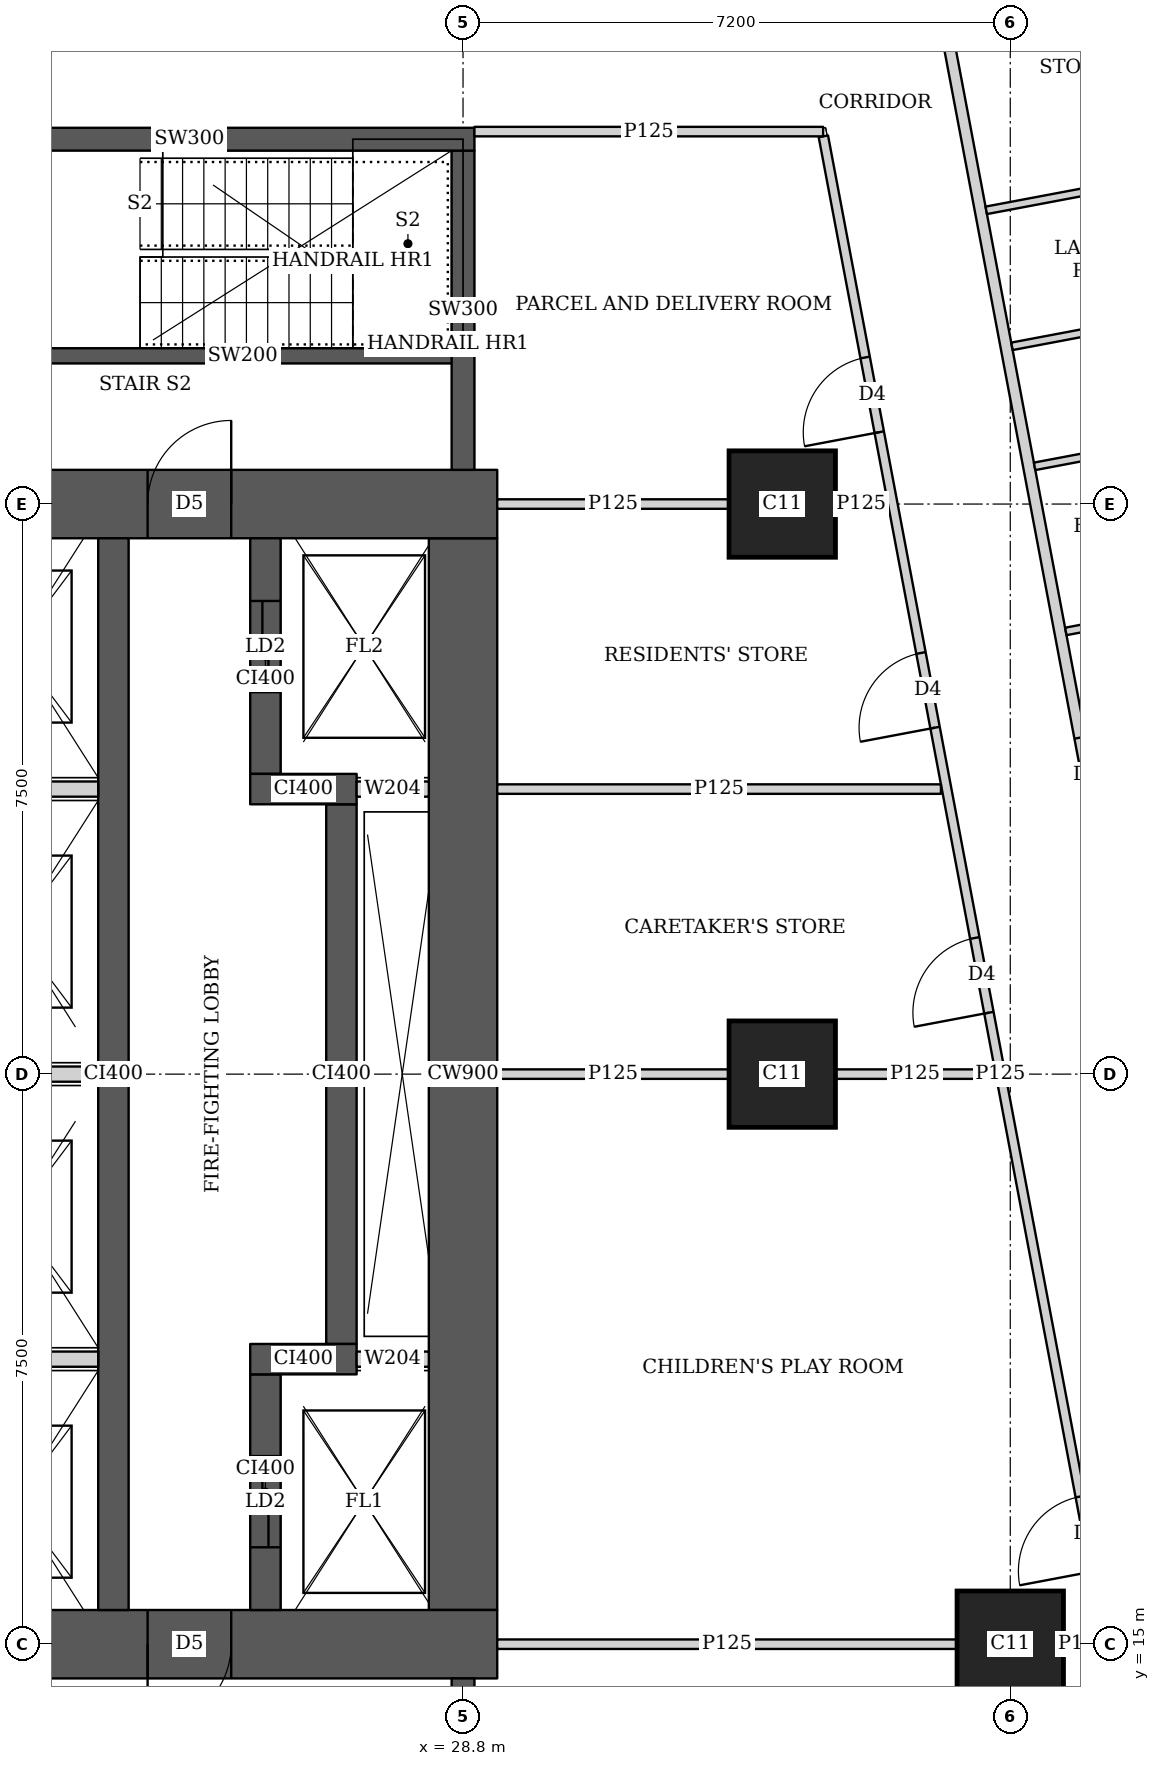
"""IFC4 building model, lengths in metres.
Left out: names, types, materials, properties, quantities, classifications, styles, units other than length and angle.
Written with IfcOpenShell. Run it as: python <this file> out.ifc"""

import sys

from ifc_helpers import new_model, si_unit, direction, frame, frame_2d, origin, origin_2d, place, context, subcontext, project, spatial, rectangle, extrude, element, fill, save


model = new_model("IFC4")
c1 = context("Model", 3, precision=1e-05, world=origin(), true_north=direction((0.0, 1.0)))
c2 = subcontext(c1, "Body", "Model", "MODEL_VIEW")
j1 = project(units=[si_unit("LENGTHUNIT", "METRE"), si_unit("PLANEANGLEUNIT", "RADIAN")], contexts=[c1])
p1 = place(None, origin())
s1 = spatial("IfcSite", under=j1, at=p1, CompositionType="ELEMENT")
p2 = place(p1, origin())
s2 = spatial("IfcBuilding", under=s1, at=p2, CompositionType="ELEMENT")
p3 = place(p2, frame((0.0, 0.0, 270.35)))
s3 = spatial("IfcBuildingStorey", under=s2, at=p3, CompositionType="ELEMENT", Elevation=270.35)
for number, where, z_axis, x_axis in (
    (1, (36.0, 15.0, 0.0), (0.0, 0.0, 1.0), (1.0, 0.0, 0.0)),
    (2, (33.0, 22.5, 0.0), (0.0, 0.0, 1.0), (1.0, 0.0, 0.0)),
    (3, (33.0, 30.0, 0.0), (0.0, 0.0, 1.0), (1.0, 0.0, 0.0)),
):
    element("IfcColumn", number, at=place(p3, frame(where, z_axis=z_axis, x_axis=x_axis)), inside=s3, PredefinedType="COLUMN", context=c2, shape_type="SweptSolid", body=[
        extrude(rectangle(XDim=1.4, YDim=1.4, at=origin_2d()), origin(), (0.0, 0.0, 1.0), 3.75),
    ])
p4 = place(p3, frame((13.95, 15.0, 0.0), z_axis=(0.0, 0.0, 1.0), x_axis=(1.0, 0.0, 0.0)))
e4 = element("IfcWall", 4, at=p4, inside=s3, PredefinedType="SHEAR", context=c2, shape_type="SweptSolid", body=[
    extrude(rectangle(XDim=15.3, YDim=0.9, at=frame_2d((7.65, 0.0))), origin(), (0.0, 0.0, 1.0), 3.75),
])
p5 = place(p4, frame((4.45, 0.0, 0.0)))
e5 = element("IfcOpeningElement", 5, at=p5, cuts=e4, PredefinedType="OPENING", context=c2, shape_type="SweptSolid", body=[
    extrude(rectangle(XDim=1.8, YDim=2.1, at=frame_2d((0.9, 1.05))), frame((0.0, 0.46, 0.0), z_axis=(0.0, -1.0, 0.0), x_axis=(1.0, 0.0, 0.0)), (0.0, 0.0, 1.0), 0.92),
])
p6 = place(p4, frame((10.7, 0.0, 0.0)))
e6 = element("IfcOpeningElement", 6, at=p6, cuts=e4, PredefinedType="OPENING", context=c2, shape_type="SweptSolid", body=[
    extrude(rectangle(XDim=1.1, YDim=2.1, at=frame_2d((0.55, 1.05))), frame((0.0, 0.46, 0.0), z_axis=(0.0, -1.0, 0.0), x_axis=(1.0, 0.0, 0.0)), (0.0, 0.0, 1.0), 0.92),
])
p7 = place(p3, frame((13.95, 30.0, 0.0), z_axis=(0.0, 0.0, 1.0), x_axis=(1.0, 0.0, 0.0)))
e7 = element("IfcWall", 7, at=p7, inside=s3, PredefinedType="SHEAR", context=c2, shape_type="SweptSolid", body=[
    extrude(rectangle(XDim=15.3, YDim=0.9, at=frame_2d((7.65, 0.0))), origin(), (0.0, 0.0, 1.0), 3.75),
])
p8 = place(p7, frame((4.45, 0.0, 0.0)))
e8 = element("IfcOpeningElement", 8, at=p8, cuts=e7, PredefinedType="OPENING", context=c2, shape_type="SweptSolid", body=[
    extrude(rectangle(XDim=1.8, YDim=2.1, at=frame_2d((0.9, 1.05))), frame((0.0, 0.46, 0.0), z_axis=(0.0, -1.0, 0.0), x_axis=(1.0, 0.0, 0.0)), (0.0, 0.0, 1.0), 0.92),
])
p9 = place(p7, frame((10.7, 0.0, 0.0)))
e9 = element("IfcOpeningElement", 9, at=p9, cuts=e7, PredefinedType="OPENING", context=c2, shape_type="SweptSolid", body=[
    extrude(rectangle(XDim=1.1, YDim=2.1, at=frame_2d((0.55, 1.05))), frame((0.0, 0.46, 0.0), z_axis=(0.0, -1.0, 0.0), x_axis=(1.0, 0.0, 0.0)), (0.0, 0.0, 1.0), 0.92),
])
p10 = place(p3, frame((28.8, 15.45, 0.0), z_axis=(0.0, 0.0, 1.0), x_axis=(0.0, 1.0, 0.0)))
e10 = element("IfcWall", 10, at=p10, inside=s3, PredefinedType="SHEAR", context=c2, shape_type="SweptSolid", body=[
    extrude(rectangle(XDim=14.1, YDim=0.9, at=frame_2d((7.05, 0.0))), origin(), (0.0, 0.0, 1.0), 3.75),
])
p11 = place(p3, frame((24.2, 15.45, 0.0), z_axis=(0.0, 0.0, 1.0), x_axis=(0.0, 1.0, 0.0)))
e11 = element("IfcWall", 11, at=p11, inside=s3, PredefinedType="SHEAR", context=c2, shape_type="SweptSolid", body=[
    extrude(rectangle(XDim=14.1, YDim=0.4, at=frame_2d((7.05, 0.0))), origin(), (0.0, 0.0, 1.0), 3.75),
])
p12 = place(p3, frame((26.2, 15.45, 0.0), z_axis=(0.0, 0.0, 1.0), x_axis=(0.0, 1.0, 0.0)))
e12 = element("IfcWall", 12, at=p12, inside=s3, PredefinedType="SHEAR", context=c2, shape_type="SweptSolid", body=[
    extrude(rectangle(XDim=3.1, YDim=0.4, at=frame_2d((1.55, 0.0))), origin(), (0.0, 0.0, 1.0), 3.75),
])
p13 = place(p12, frame((0.825, 0.0, 0.0)))
e13 = element("IfcOpeningElement", 13, at=p13, cuts=e12, PredefinedType="OPENING", context=c2, shape_type="SweptSolid", body=[
    extrude(rectangle(XDim=1.2, YDim=2.1, at=frame_2d((0.6, 1.05))), frame((0.0, 0.21, 0.0), z_axis=(0.0, -1.0, 0.0), x_axis=(1.0, 0.0, 0.0)), (0.0, 0.0, 1.0), 0.42),
])
p14 = place(p3, frame((26.0, 18.75, 0.0), z_axis=(0.0, 0.0, 1.0), x_axis=(1.0, 0.0, 0.0)))
e14 = element("IfcWall", 14, at=p14, inside=s3, PredefinedType="SHEAR", context=c2, shape_type="SweptSolid", body=[
    extrude(rectangle(XDim=1.4, YDim=0.4, at=frame_2d((0.7, 0.0))), origin(), (0.0, 0.0, 1.0), 3.75),
])
p15 = place(p3, frame((27.2, 18.95, 0.0), z_axis=(0.0, 0.0, 1.0), x_axis=(0.0, 1.0, 0.0)))
e15 = element("IfcWall", 15, at=p15, inside=s3, PredefinedType="SHEAR", context=c2, shape_type="SweptSolid", body=[
    extrude(rectangle(XDim=7.1, YDim=0.4, at=frame_2d((3.55, 0.0))), origin(), (0.0, 0.0, 1.0), 3.75),
])
p16 = place(p3, frame((26.0, 26.25, 0.0), z_axis=(0.0, 0.0, 1.0), x_axis=(1.0, 0.0, 0.0)))
e16 = element("IfcWall", 16, at=p16, inside=s3, PredefinedType="SHEAR", context=c2, shape_type="SweptSolid", body=[
    extrude(rectangle(XDim=1.4, YDim=0.4, at=frame_2d((0.7, 0.0))), origin(), (0.0, 0.0, 1.0), 3.75),
])
p17 = place(p3, frame((26.2, 26.45, 0.0), z_axis=(0.0, 0.0, 1.0), x_axis=(0.0, 1.0, 0.0)))
e17 = element("IfcWall", 17, at=p17, inside=s3, PredefinedType="SHEAR", context=c2, shape_type="SweptSolid", body=[
    extrude(rectangle(XDim=3.1, YDim=0.4, at=frame_2d((1.55, 0.0))), origin(), (0.0, 0.0, 1.0), 3.75),
])
p18 = place(p17, frame((1.075, 0.0, 0.0)))
e18 = element("IfcOpeningElement", 18, at=p18, cuts=e17, PredefinedType="OPENING", context=c2, shape_type="SweptSolid", body=[
    extrude(rectangle(XDim=1.2, YDim=2.1, at=frame_2d((0.6, 1.05))), frame((0.0, 0.21, 0.0), z_axis=(0.0, -1.0, 0.0), x_axis=(1.0, 0.0, 0.0)), (0.0, 0.0, 1.0), 0.42),
])
p19 = place(p3, frame((28.8, 10.35, 0.0), z_axis=(0.0, 0.0, 1.0), x_axis=(0.0, 1.0, 0.0)))
e19 = element("IfcWall", 19, at=p19, inside=s3, PredefinedType="SHEAR", context=c2, shape_type="SweptSolid", body=[
    extrude(rectangle(XDim=4.2, YDim=0.3, at=frame_2d((2.1, 0.0))), origin(), (0.0, 0.0, 1.0), 3.75),
])
p20 = place(p3, frame((21.45, 34.8, 0.0), z_axis=(0.0, 0.0, 1.0), x_axis=(1.0, 0.0, 0.0)))
e20 = element("IfcWall", 20, at=p20, inside=s3, PredefinedType="SHEAR", context=c2, shape_type="SweptSolid", body=[
    extrude(rectangle(XDim=7.5, YDim=0.3, at=frame_2d((3.75, 0.0))), origin(), (0.0, 0.0, 1.0), 3.75),
])
p21 = place(p20, frame((0.5, 0.0, 0.0)))
e21 = element("IfcOpeningElement", 21, at=p21, cuts=e20, PredefinedType="OPENING", context=c2, shape_type="SweptSolid", body=[
    extrude(rectangle(XDim=1.1, YDim=2.1, at=frame_2d((0.55, 1.05))), frame((0.0, 0.16, 0.0), z_axis=(0.0, -1.0, 0.0), x_axis=(1.0, 0.0, 0.0)), (0.0, 0.0, 1.0), 0.32),
])
p22 = place(p3, frame((28.8, 30.45, 0.0), z_axis=(0.0, 0.0, 1.0), x_axis=(0.0, 1.0, 0.0)))
e22 = element("IfcWall", 22, at=p22, inside=s3, PredefinedType="SHEAR", context=c2, shape_type="SweptSolid", body=[
    extrude(rectangle(XDim=4.2, YDim=0.3, at=frame_2d((2.1, 0.0))), origin(), (0.0, 0.0, 1.0), 3.75),
])
p23 = place(p3, frame((34.036, 42.186, 0.0), z_axis=(0.0, 0.0, 1.0), x_axis=(0.185593518645, -0.9826266055, 0.0)))
e23 = element("IfcWall", 23, at=p23, inside=s3, PredefinedType="SOLIDWALL", context=c2, shape_type="SweptSolid", body=[
    extrude(rectangle(XDim=35.961, YDim=0.15, at=frame_2d((17.98, 0.0))), origin(), (0.0, 0.0, 1.0), 2.5),
])
p24 = place(p23, frame((15.529, 0.0, 0.0)))
e24 = element("IfcOpeningElement", 24, at=p24, cuts=e23, PredefinedType="OPENING", context=c2, shape_type="SweptSolid", body=[
    extrude(rectangle(XDim=1.0, YDim=2.1, at=frame_2d((0.5, 1.05))), frame((0.0, 0.085, 0.0), z_axis=(0.0, -1.0, 0.0), x_axis=(1.0, 0.0, 0.0)), (0.0, 0.0, 1.0), 0.17),
])
p25 = place(p23, frame((19.345, 0.0, 0.0)))
e25 = element("IfcOpeningElement", 25, at=p25, cuts=e23, PredefinedType="OPENING", context=c2, shape_type="SweptSolid", body=[
    extrude(rectangle(XDim=1.0, YDim=2.1, at=frame_2d((0.5, 1.05))), frame((0.0, 0.085, 0.0), z_axis=(0.0, -1.0, 0.0), x_axis=(1.0, 0.0, 0.0)), (0.0, 0.0, 1.0), 0.17),
])
p26 = place(p23, frame((30.594, 0.0, 0.0)))
e26 = element("IfcOpeningElement", 26, at=p26, cuts=e23, PredefinedType="OPENING", context=c2, shape_type="SweptSolid", body=[
    extrude(rectangle(XDim=1.0, YDim=2.1, at=frame_2d((0.5, 1.05))), frame((0.0, 0.085, 0.0), z_axis=(0.0, -1.0, 0.0), x_axis=(1.0, 0.0, 0.0)), (0.0, 0.0, 1.0), 0.17),
])
p27 = place(p3, frame((39.24, 32.683, 0.0), z_axis=(0.0, 0.0, 1.0), x_axis=(-0.982607026909, -0.185697147715, 0.0)))
e27 = element("IfcWall", 27, at=p27, inside=s3, PredefinedType="PARTITIONING", context=c2, shape_type="SweptSolid", body=[
    extrude(rectangle(XDim=3.275, YDim=0.1, at=frame_2d((1.637, 0.0))), origin(), (0.0, 0.0, 1.0), 3.5),
])
p28 = place(p3, frame((39.997, 28.942, 0.0), z_axis=(0.0, 0.0, 1.0), x_axis=(-0.982569883123, -0.185893584556, 0.0)))
e28 = element("IfcWall", 28, at=p28, inside=s3, PredefinedType="PARTITIONING", context=c2, shape_type="SweptSolid", body=[
    extrude(rectangle(XDim=3.324, YDim=0.1, at=frame_2d((1.662, 0.0))), origin(), (0.0, 0.0, 1.0), 3.5),
])
p29 = place(p3, frame((39.538, 31.104, 0.0), z_axis=(0.0, 0.0, 1.0), x_axis=(-0.982620626894, -0.185625169636, 0.0)))
e29 = element("IfcWall", 29, at=p29, inside=s3, PredefinedType="PARTITIONING", context=c2, shape_type="SweptSolid", body=[
    extrude(rectangle(XDim=3.275, YDim=0.1, at=frame_2d((1.637, 0.0))), origin(), (0.0, 0.0, 1.0), 2.5),
])
p30 = place(p3, frame((38.902, 34.471, 0.0), z_axis=(0.0, 0.0, 1.0), x_axis=(-0.982674977865, -0.185337227447, 0.0)))
e30 = element("IfcWall", 30, at=p30, inside=s3, PredefinedType="PARTITIONING", context=c2, shape_type="SweptSolid", body=[
    extrude(rectangle(XDim=3.275, YDim=0.1, at=frame_2d((1.637, 0.0))), origin(), (0.0, 0.0, 1.0), 3.5),
])
p31 = place(p3, frame((28.95, 34.9, 0.0), z_axis=(0.0, 0.0, 1.0), x_axis=(1.0, 0.0, 0.0)))
e31 = element("IfcWall", 31, at=p31, inside=s3, PredefinedType="PARTITIONING", context=c2, shape_type="SweptSolid", body=[
    extrude(rectangle(XDim=4.588, YDim=0.125, at=frame_2d((2.294, 0.0))), origin(), (0.0, 0.0, 1.0), 3.5),
])
p32 = place(p3, frame((38.202, 10.163, 0.0), z_axis=(0.0, 0.0, 1.0), x_axis=(-0.185610321132, 0.982623431783, 0.0)))
e32 = element("IfcWall", 32, at=p32, inside=s3, PredefinedType="PARTITIONING", context=c2, shape_type="SweptSolid", body=[
    extrude(rectangle(XDim=25.111, YDim=0.125, at=frame_2d((12.556, 0.0))), origin(), (0.0, 0.0, 1.0), 2.5),
])
p33 = place(p32, frame((0.708, 0.0, 0.0)))
e33 = element("IfcOpeningElement", 33, at=p33, cuts=e32, PredefinedType="OPENING", context=c2, shape_type="SweptSolid", body=[
    extrude(rectangle(XDim=1.0, YDim=2.1, at=frame_2d((0.5, 1.05))), frame((0.0, 0.073, 0.0), z_axis=(0.0, -1.0, 0.0), x_axis=(1.0, 0.0, 0.0)), (0.0, 0.0, 1.0), 0.145),
])
p34 = place(p32, frame((5.9, 0.0, 0.0)))
e34 = element("IfcOpeningElement", 34, at=p34, cuts=e32, PredefinedType="OPENING", context=c2, shape_type="SweptSolid", body=[
    extrude(rectangle(XDim=1.0, YDim=2.1, at=frame_2d((0.5, 1.05))), frame((0.0, 0.073, 0.0), z_axis=(0.0, -1.0, 0.0), x_axis=(1.0, 0.0, 0.0)), (0.0, 0.0, 1.0), 0.145),
])
p35 = place(p32, frame((13.378, 0.0, 0.0)))
e35 = element("IfcOpeningElement", 35, at=p35, cuts=e32, PredefinedType="OPENING", context=c2, shape_type="SweptSolid", body=[
    extrude(rectangle(XDim=1.0, YDim=2.1, at=frame_2d((0.5, 1.05))), frame((0.0, 0.073, 0.0), z_axis=(0.0, -1.0, 0.0), x_axis=(1.0, 0.0, 0.0)), (0.0, 0.0, 1.0), 0.145),
])
p36 = place(p32, frame((17.194, 0.0, 0.0)))
e36 = element("IfcOpeningElement", 36, at=p36, cuts=e32, PredefinedType="OPENING", context=c2, shape_type="SweptSolid", body=[
    extrude(rectangle(XDim=1.0, YDim=2.1, at=frame_2d((0.5, 1.05))), frame((0.0, 0.073, 0.0), z_axis=(0.0, -1.0, 0.0), x_axis=(1.0, 0.0, 0.0)), (0.0, 0.0, 1.0), 0.145),
])
p37 = place(p32, frame((21.15, 0.0, 0.0)))
e37 = element("IfcOpeningElement", 37, at=p37, cuts=e32, PredefinedType="OPENING", context=c2, shape_type="SweptSolid", body=[
    extrude(rectangle(XDim=1.0, YDim=2.1, at=frame_2d((0.5, 1.05))), frame((0.0, 0.073, 0.0), z_axis=(0.0, -1.0, 0.0), x_axis=(1.0, 0.0, 0.0)), (0.0, 0.0, 1.0), 0.145),
])
p38 = place(p3, frame((29.25, 15.0, 0.0), z_axis=(0.0, 0.0, 1.0), x_axis=(1.0, 0.0, 0.0)))
e38 = element("IfcWall", 38, at=p38, inside=s3, PredefinedType="PARTITIONING", context=c2, shape_type="SweptSolid", body=[
    extrude(rectangle(XDim=6.049, YDim=0.125, at=frame_2d((3.024, 0.0))), origin(), (0.0, 0.0, 1.0), 3.5),
])
p39 = place(p3, frame((36.701, 15.0, 0.0), z_axis=(0.0, 0.0, 1.0), x_axis=(1.0, 0.0, 0.0)))
e39 = element("IfcWall", 39, at=p39, inside=s3, PredefinedType="PARTITIONING", context=c2, shape_type="SweptSolid", body=[
    extrude(rectangle(XDim=0.512, YDim=0.125, at=frame_2d((0.256, 0.0))), origin(), (0.0, 0.0, 1.0), 3.5),
])
p40 = place(p3, frame((29.25, 22.5, 0.0), z_axis=(0.0, 0.0, 1.0), x_axis=(1.0, 0.0, 0.0)))
e40 = element("IfcWall", 40, at=p40, inside=s3, PredefinedType="PARTITIONING", context=c2, shape_type="SweptSolid", body=[
    extrude(rectangle(XDim=3.049, YDim=0.125, at=frame_2d((1.524, 0.0))), origin(), (0.0, 0.0, 1.0), 3.5),
])
p41 = place(p3, frame((33.701, 22.5, 0.0), z_axis=(0.0, 0.0, 1.0), x_axis=(1.0, 0.0, 0.0)))
e41 = element("IfcWall", 41, at=p41, inside=s3, PredefinedType="PARTITIONING", context=c2, shape_type="SweptSolid", body=[
    extrude(rectangle(XDim=2.095, YDim=0.125, at=frame_2d((1.047, 0.0))), origin(), (0.0, 0.0, 1.0), 2.5),
])
p42 = place(p3, frame((29.25, 26.25, 0.0), z_axis=(0.0, 0.0, 1.0), x_axis=(1.0, 0.0, 0.0)))
e42 = element("IfcWall", 42, at=p42, inside=s3, PredefinedType="PARTITIONING", context=c2, shape_type="SweptSolid", body=[
    extrude(rectangle(XDim=5.838, YDim=0.125, at=frame_2d((2.919, 0.0))), origin(), (0.0, 0.0, 1.0), 3.5),
])
p43 = place(p3, frame((29.25, 30.0, 0.0), z_axis=(0.0, 0.0, 1.0), x_axis=(1.0, 0.0, 0.0)))
e43 = element("IfcWall", 43, at=p43, inside=s3, PredefinedType="PARTITIONING", context=c2, shape_type="SweptSolid", body=[
    extrude(rectangle(XDim=3.049, YDim=0.125, at=frame_2d((1.524, 0.0))), origin(), (0.0, 0.0, 1.0), 3.5),
])
p44 = place(p3, frame((33.701, 30.0, 0.0), z_axis=(0.0, 0.0, 1.0), x_axis=(1.0, 0.0, 0.0)))
e44 = element("IfcWall", 44, at=p44, inside=s3, PredefinedType="PARTITIONING", context=c2, shape_type="SweptSolid", body=[
    extrude(rectangle(XDim=0.678, YDim=0.125, at=frame_2d((0.339, 0.0))), origin(), (0.0, 0.0, 1.0), 2.5),
])
p45 = place(p3, frame((23.0, 31.95, 0.0), z_axis=(0.0, 0.0, 1.0), x_axis=(1.0, 0.0, 0.0)))
e45 = element("IfcWall", 45, at=p45, inside=s3, PredefinedType="SHEAR", context=c2, shape_type="SweptSolid", body=[
    extrude(rectangle(XDim=5.8, YDim=0.2, at=frame_2d((2.9, 0.0))), origin(), (0.0, 0.0, 1.0), 3.75),
])
for number, where, z_axis, x_axis in (
    (46, (21.8, 18.75, 0.0), (0.0, 0.0, 1.0), (1.0, 0.0, 0.0)),
    (47, (21.8, 22.5, 0.0), (0.0, 0.0, 1.0), (1.0, 0.0, 0.0)),
    (48, (21.8, 26.25, 0.0), (0.0, 0.0, 1.0), (1.0, 0.0, 0.0)),
):
    element("IfcWall", number, at=place(p3, frame(where, z_axis=z_axis, x_axis=x_axis)), inside=s3, PredefinedType="SOLIDWALL", context=c2, shape_type="SweptSolid", body=[
        extrude(rectangle(XDim=2.2, YDim=0.2, at=frame_2d((1.1, 0.0))), origin(), (0.0, 0.0, 1.0), 3.5),
    ])
for number, where, z_axis, x_axis in (
    (49, (27.4, 18.75, 0.0), (0.0, 0.0, 1.0), (1.0, 0.0, 0.0)),
    (50, (27.4, 26.25, 0.0), (0.0, 0.0, 1.0), (1.0, 0.0, 0.0)),
):
    element("IfcWall", number, at=place(p3, frame(where, z_axis=z_axis, x_axis=x_axis)), inside=s3, PredefinedType="SOLIDWALL", context=c2, shape_type="SweptSolid", body=[
        extrude(rectangle(XDim=0.95, YDim=0.2, at=frame_2d((0.475, 0.0))), origin(), (0.0, 0.0, 1.0), 3.5),
    ])
p46 = place(p24, origin())
e51 = element("IfcDoor", 51, at=p46, inside=s3, OperationType="SINGLE_SWING_LEFT", PredefinedType="DOOR", context=c2, shape_type="SweptSolid", body=[
    extrude(rectangle(XDim=1.0, YDim=2.1, at=frame_2d((0.5, 1.05))), frame((0.0, 0.025, 0.0), z_axis=(0.0, -1.0, 0.0), x_axis=(1.0, 0.0, 0.0)), (0.0, 0.0, 1.0), 0.05),
])
fill(e24, e51)
p47 = place(p34, origin())
e52 = element("IfcDoor", 52, at=p47, inside=s3, OperationType="SINGLE_SWING_LEFT", PredefinedType="DOOR", context=c2, shape_type="SweptSolid", body=[
    extrude(rectangle(XDim=1.0, YDim=2.1, at=frame_2d((0.5, 1.05))), frame((0.0, 0.025, 0.0), z_axis=(0.0, -1.0, 0.0), x_axis=(1.0, 0.0, 0.0)), (0.0, 0.0, 1.0), 0.05),
])
fill(e34, e52)
p48 = place(p35, origin())
e53 = element("IfcDoor", 53, at=p48, inside=s3, OperationType="SINGLE_SWING_LEFT", PredefinedType="DOOR", context=c2, shape_type="SweptSolid", body=[
    extrude(rectangle(XDim=1.0, YDim=2.1, at=frame_2d((0.5, 1.05))), frame((0.0, 0.025, 0.0), z_axis=(0.0, -1.0, 0.0), x_axis=(1.0, 0.0, 0.0)), (0.0, 0.0, 1.0), 0.05),
])
fill(e35, e53)
p49 = place(p36, origin())
e54 = element("IfcDoor", 54, at=p49, inside=s3, OperationType="SINGLE_SWING_LEFT", PredefinedType="DOOR", context=c2, shape_type="SweptSolid", body=[
    extrude(rectangle(XDim=1.0, YDim=2.1, at=frame_2d((0.5, 1.05))), frame((0.0, 0.025, 0.0), z_axis=(0.0, -1.0, 0.0), x_axis=(1.0, 0.0, 0.0)), (0.0, 0.0, 1.0), 0.05),
])
fill(e36, e54)
p50 = place(p37, origin())
e55 = element("IfcDoor", 55, at=p50, inside=s3, OperationType="SINGLE_SWING_LEFT", PredefinedType="DOOR", context=c2, shape_type="SweptSolid", body=[
    extrude(rectangle(XDim=1.0, YDim=2.1, at=frame_2d((0.5, 1.05))), frame((0.0, 0.025, 0.0), z_axis=(0.0, -1.0, 0.0), x_axis=(1.0, 0.0, 0.0)), (0.0, 0.0, 1.0), 0.05),
])
fill(e37, e55)
p51 = place(p6, origin())
e56 = element("IfcDoor", 56, at=p51, inside=s3, OperationType="SINGLE_SWING_RIGHT", PredefinedType="DOOR", context=c2, shape_type="SweptSolid", body=[
    extrude(rectangle(XDim=1.1, YDim=2.1, at=frame_2d((0.55, 1.05))), frame((0.0, 0.025, 0.0), z_axis=(0.0, -1.0, 0.0), x_axis=(1.0, 0.0, 0.0)), (0.0, 0.0, 1.0), 0.05),
])
fill(e6, e56)
p52 = place(p9, origin())
e57 = element("IfcDoor", 57, at=p52, inside=s3, OperationType="SINGLE_SWING_RIGHT", PredefinedType="DOOR", context=c2, shape_type="SweptSolid", body=[
    extrude(rectangle(XDim=1.1, YDim=2.1, at=frame_2d((0.55, 1.05))), frame((0.0, 0.025, 0.0), z_axis=(0.0, -1.0, 0.0), x_axis=(1.0, 0.0, 0.0)), (0.0, 0.0, 1.0), 0.05),
])
fill(e9, e57)
p53 = place(p13, origin())
e58 = element("IfcDoor", 58, at=p53, inside=s3, OperationType="DOUBLE_DOOR_SLIDING", PredefinedType="DOOR", context=c2, shape_type="SweptSolid", body=[
    extrude(rectangle(XDim=1.2, YDim=2.1, at=frame_2d((0.6, 1.05))), frame((0.0, 0.025, 0.0), z_axis=(0.0, -1.0, 0.0), x_axis=(1.0, 0.0, 0.0)), (0.0, 0.0, 1.0), 0.05),
])
fill(e13, e58)
p54 = place(p18, origin())
e59 = element("IfcDoor", 59, at=p54, inside=s3, OperationType="DOUBLE_DOOR_SLIDING", PredefinedType="DOOR", context=c2, shape_type="SweptSolid", body=[
    extrude(rectangle(XDim=1.2, YDim=2.1, at=frame_2d((0.6, 1.05))), frame((0.0, 0.025, 0.0), z_axis=(0.0, -1.0, 0.0), x_axis=(1.0, 0.0, 0.0)), (0.0, 0.0, 1.0), 0.05),
])
fill(e18, e59)
save(model, sys.argv[1])
